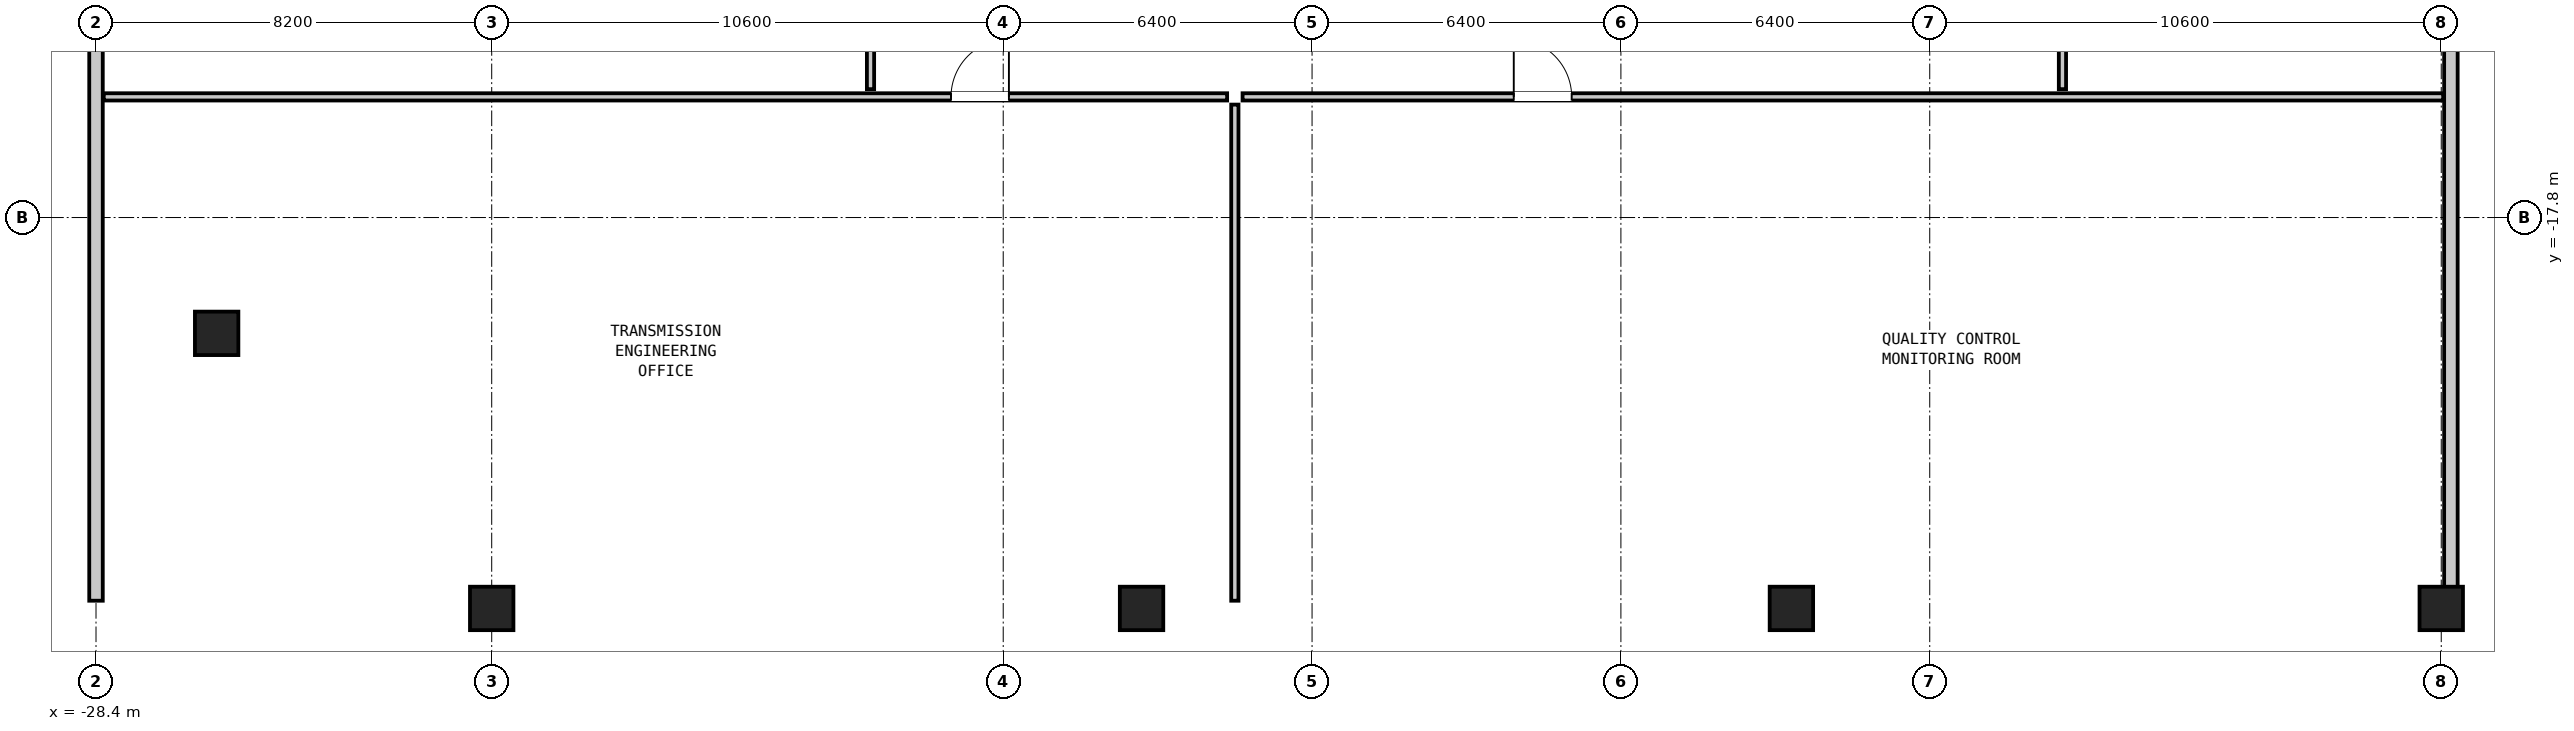
"""IFC4 building model, lengths in metres.
Left out: names, types, materials, properties, quantities, classifications, styles, units other than length and angle.
Written with IfcOpenShell. Run it as: python <this file> out.ifc"""

import sys

from ifc_helpers import new_model, si_unit, direction, frame, frame_2d, origin, origin_2d, place, context, subcontext, project, spatial, rectangle, hollow_rectangle, extrude, element, fill, save


model = new_model("IFC4")
c1 = context("Model", 3, precision=1e-05, world=origin(), true_north=direction((0.0, 1.0)))
c2 = subcontext(c1, "Body", "Model", "MODEL_VIEW")
j1 = project(units=[si_unit("LENGTHUNIT", "METRE"), si_unit("PLANEANGLEUNIT", "RADIAN")], contexts=[c1])
p1 = place(None, origin())
s1 = spatial("IfcSite", under=j1, at=p1, CompositionType="ELEMENT")
p2 = place(p1, origin())
s2 = spatial("IfcBuilding", under=s1, at=p2, CompositionType="ELEMENT")
p3 = place(p2, frame((0.0, 0.0, 13.5)))
s3 = spatial("IfcBuildingStorey", under=s2, at=p3, CompositionType="ELEMENT", Elevation=13.5)
for number, where, z_axis, x_axis in (
    (1, (-20.2, -25.9, 0.0), (0.0, 0.0, 1.0), (1.0, 0.0, 0.0)),
    (2, (-6.733, -25.9, 0.0), (0.0, 0.0, 1.0), (1.0, 0.0, 0.0)),
    (3, (6.733, -25.9, 0.0), (0.0, 0.0, 1.0), (1.0, 0.0, 0.0)),
    (4, (20.2, -25.9, 0.0), (0.0, 0.0, 1.0), (1.0, 0.0, 0.0)),
    (5, (-25.9, -20.2, 0.0), (0.0, 0.0, 1.0), (0.0, 1.0, 0.0)),
):
    element("IfcColumn", number, at=place(p3, frame(where, z_axis=z_axis, x_axis=x_axis)), inside=s3, PredefinedType="COLUMN", context=c2, shape_type="SweptSolid", body=[
        extrude(hollow_rectangle(XDim=0.9, YDim=0.9, WallThickness=0.055, at=origin_2d()), origin(), (0.0, 0.0, 1.0), 4.2),
    ])
p4 = place(p3, frame((-28.4, -25.74, 0.0), z_axis=(0.0, 0.0, 1.0), x_axis=(0.0, 1.0, 0.0)))
e6 = element("IfcWall", 6, at=p4, inside=s3, PredefinedType="MOVABLE", context=c2, shape_type="SweptSolid", body=[
    extrude(rectangle(XDim=51.48, YDim=0.28, at=frame_2d((25.74, 0.0))), origin(), (0.0, 0.0, 1.0), 3.88),
])
p5 = place(p4, frame((25.255, 0.0, 0.0)))
e7 = element("IfcOpeningElement", 7, at=p5, cuts=e6, PredefinedType="OPENING", context=c2, shape_type="SweptSolid", body=[
    extrude(rectangle(XDim=2.0, YDim=2.14, at=frame_2d((1.0, 1.07))), frame((0.0, 0.152, 0.0), z_axis=(0.0, -1.0, 0.0), x_axis=(1.0, 0.0, 0.0)), (0.0, 0.0, 1.0), 0.304),
])
p6 = place(p3, frame((20.4, -25.74, 0.0), z_axis=(0.0, 0.0, 1.0), x_axis=(0.0, 1.0, 0.0)))
e8 = element("IfcWall", 8, at=p6, inside=s3, PredefinedType="MOVABLE", context=c2, shape_type="SweptSolid", body=[
    extrude(rectangle(XDim=51.48, YDim=0.28, at=frame_2d((25.74, 0.0))), origin(), (0.0, 0.0, 1.0), 3.253),
])
p7 = place(p6, frame((25.255, 0.0, 0.0)))
e9 = element("IfcOpeningElement", 9, at=p7, cuts=e8, PredefinedType="OPENING", context=c2, shape_type="SweptSolid", body=[
    extrude(rectangle(XDim=2.0, YDim=2.14, at=frame_2d((1.0, 1.07))), frame((0.0, 0.152, 0.0), z_axis=(0.0, -1.0, 0.0), x_axis=(1.0, 0.0, 0.0)), (0.0, 0.0, 1.0), 0.304),
])
p8 = place(p3, frame((-28.24, -15.3, 0.0), z_axis=(0.0, 0.0, 1.0), x_axis=(1.0, 0.0, 0.0)))
e10 = element("IfcWall", 10, at=p8, inside=s3, PredefinedType="PARTITIONING", context=c2, shape_type="SweptSolid", body=[
    extrude(rectangle(XDim=23.28, YDim=0.15, at=frame_2d((11.64, 0.0))), origin(), (0.0, 0.0, 1.0), 3.88),
])
p9 = place(p8, frame((17.558, 0.0, 0.0)))
e11 = element("IfcOpeningElement", 11, at=p9, cuts=e10, PredefinedType="OPENING", context=c2, shape_type="SweptSolid", body=[
    extrude(rectangle(XDim=1.2, YDim=2.1, at=frame_2d((0.6, 1.05))), frame((0.0, 0.087, 0.0), z_axis=(0.0, -1.0, 0.0), x_axis=(1.0, 0.0, 0.0)), (0.0, 0.0, 1.0), 0.174),
])
p10 = place(p3, frame((-4.64, -15.3, 0.0), z_axis=(0.0, 0.0, 1.0), x_axis=(1.0, 0.0, 0.0)))
e12 = element("IfcWall", 12, at=p10, inside=s3, PredefinedType="PARTITIONING", context=c2, shape_type="SweptSolid", body=[
    extrude(rectangle(XDim=24.88, YDim=0.15, at=frame_2d((12.44, 0.0))), origin(), (0.0, 0.0, 1.0), 3.88),
])
p11 = place(p10, frame((5.62, 0.0, 0.0)))
e13 = element("IfcOpeningElement", 13, at=p11, cuts=e12, PredefinedType="OPENING", context=c2, shape_type="SweptSolid", body=[
    extrude(rectangle(XDim=1.2, YDim=2.1, at=frame_2d((0.6, 1.05))), frame((0.0, 0.087, 0.0), z_axis=(0.0, -1.0, 0.0), x_axis=(1.0, 0.0, 0.0)), (0.0, 0.0, 1.0), 0.174),
])
p12 = place(p3, frame((-4.8, -25.74, 0.0), z_axis=(0.0, 0.0, 1.0), x_axis=(0.0, 1.0, 0.0)))
e14 = element("IfcWall", 14, at=p12, inside=s3, PredefinedType="PARTITIONING", context=c2, shape_type="SweptSolid", body=[
    extrude(rectangle(XDim=10.28, YDim=0.15, at=frame_2d((5.14, 0.0))), origin(), (0.0, 0.0, 1.0), 3.88),
])
p13 = place(p3, frame((-12.35, -15.14, 0.0), z_axis=(0.0, 0.0, 1.0), x_axis=(0.0, 1.0, 0.0)))
e15 = element("IfcWall", 15, at=p13, inside=s3, PredefinedType="PARTITIONING", context=c2, shape_type="SweptSolid", body=[
    extrude(rectangle(XDim=12.58, YDim=0.15, at=frame_2d((6.29, 0.0))), origin(), (0.0, 0.0, 1.0), 3.88),
])
p14 = place(p13, frame((5.815, 0.0, 0.0)))
e16 = element("IfcOpeningElement", 16, at=p14, cuts=e15, PredefinedType="OPENING", context=c2, shape_type="SweptSolid", body=[
    extrude(rectangle(XDim=0.95, YDim=2.1, at=frame_2d((0.475, 1.05))), frame((0.0, 0.087, 0.0), z_axis=(0.0, -1.0, 0.0), x_axis=(1.0, 0.0, 0.0)), (0.0, 0.0, 1.0), 0.174),
])
p15 = place(p3, frame((12.35, -15.14, 0.0), z_axis=(0.0, 0.0, 1.0), x_axis=(0.0, 1.0, 0.0)))
e17 = element("IfcWall", 17, at=p15, inside=s3, PredefinedType="PARTITIONING", context=c2, shape_type="SweptSolid", body=[
    extrude(rectangle(XDim=12.6, YDim=0.15, at=frame_2d((6.3, 0.0))), origin(), (0.0, 0.0, 1.0), 3.88),
])
p16 = place(p15, frame((5.825, 0.0, 0.0)))
e18 = element("IfcOpeningElement", 18, at=p16, cuts=e17, PredefinedType="OPENING", context=c2, shape_type="SweptSolid", body=[
    extrude(rectangle(XDim=0.95, YDim=2.1, at=frame_2d((0.475, 1.05))), frame((0.0, 0.087, 0.0), z_axis=(0.0, -1.0, 0.0), x_axis=(1.0, 0.0, 0.0)), (0.0, 0.0, 1.0), 0.174),
])
p17 = place(p9, origin())
e19 = element("IfcDoor", 19, at=p17, inside=s3, OperationType="SINGLE_SWING_RIGHT", PredefinedType="DOOR", context=c2, shape_type="SweptSolid", body=[
    extrude(rectangle(XDim=1.2, YDim=2.1, at=frame_2d((0.6, 1.05))), frame((0.0, 0.025, 0.0), z_axis=(0.0, -1.0, 0.0), x_axis=(1.0, 0.0, 0.0)), (0.0, 0.0, 1.0), 0.05),
])
fill(e11, e19)
p18 = place(p11, origin())
e20 = element("IfcDoor", 20, at=p18, inside=s3, OperationType="SINGLE_SWING_LEFT", PredefinedType="DOOR", context=c2, shape_type="SweptSolid", body=[
    extrude(rectangle(XDim=1.2, YDim=2.1, at=frame_2d((0.6, 1.05))), frame((0.0, 0.025, 0.0), z_axis=(0.0, -1.0, 0.0), x_axis=(1.0, 0.0, 0.0)), (0.0, 0.0, 1.0), 0.05),
])
fill(e13, e20)
save(model, sys.argv[1])
